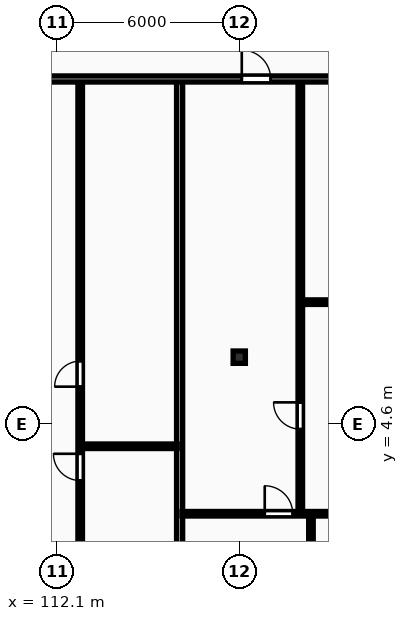
"""IFC4 building model, lengths in metres.
Left out: names, types, materials, properties, quantities, classifications, styles, units other than length and angle.
Written with IfcOpenShell. Run it as: python <this file> out.ifc"""

import sys

from ifc_helpers import new_model, si_unit, direction, frame, frame_2d, origin, origin_2d, place, context, subcontext, project, spatial, rectangle, i_section, extrude, element, fill, save


model = new_model("IFC4")
c1 = context("Model", 3, precision=1e-05, world=origin(), true_north=direction((0.0, 1.0)))
c2 = subcontext(c1, "Body", "Model", "MODEL_VIEW")
j1 = project(units=[si_unit("LENGTHUNIT", "METRE"), si_unit("PLANEANGLEUNIT", "RADIAN")], contexts=[c1])
p1 = place(None, origin())
s1 = spatial("IfcSite", under=j1, at=p1, CompositionType="ELEMENT")
p2 = place(p1, origin())
s2 = spatial("IfcBuilding", under=s1, at=p2, CompositionType="ELEMENT")
p3 = place(p2, frame((0.0, 0.0, 153.7)))
s3 = spatial("IfcBuildingStorey", under=s2, at=p3, CompositionType="ELEMENT", Elevation=153.7)
p4 = place(p3, frame((118.1, 6.8, 0.0), z_axis=(0.0, 0.0, 1.0), x_axis=(1.0, 0.0, 0.0)))
e1 = element("IfcColumn", 1, at=p4, inside=s3, PredefinedType="COLUMN", context=c2, shape_type="SweptSolid", body=[
    extrude(i_section(OverallWidth=0.403, OverallDepth=0.406, WebThickness=0.027, FlangeThickness=0.043, FilletRadius=0.015, at=origin_2d()), origin(), (0.0, 0.0, 1.0), 3.6),
])
p5 = place(p3, frame((116.138, -8.7, 0.0), z_axis=(0.0, 0.0, 1.0), x_axis=(0.0, 1.0, 0.0)))
e2 = element("IfcWall", 2, at=p5, inside=s3, PredefinedType="PARTITIONING", context=c2, shape_type="SweptSolid", body=[
    extrude(rectangle(XDim=24.57, YDim=0.2, at=frame_2d((12.285, 0.0))), origin(), (0.0, 0.0, 1.0), 3.32),
])
p6 = place(p3, frame((112.928, 3.87, 0.0), z_axis=(0.0, 0.0, 1.0), x_axis=(1.0, 0.0, 0.0)))
e3 = element("IfcWall", 3, at=p6, inside=s3, PredefinedType="PARTITIONING", context=c2, shape_type="SweptSolid", body=[
    extrude(rectangle(XDim=3.13, YDim=0.15, at=frame_2d((1.565, 0.0))), origin(), (0.0, 0.0, 1.0), 3.32),
])
p7 = place(p3, frame((112.868, -3.39, 0.0), z_axis=(0.0, 0.0, 1.0), x_axis=(0.0, 1.0, 0.0)))
e4 = element("IfcWall", 4, at=p7, inside=s3, PredefinedType="PARTITIONING", context=c2, shape_type="SweptSolid", body=[
    extrude(rectangle(XDim=19.28, YDim=0.15, at=frame_2d((9.64, 0.0))), origin(), (0.0, 0.0, 1.0), 3.32),
])
p8 = place(p7, frame((2.406, 0.0, 0.0)))
e5 = element("IfcOpeningElement", 5, at=p8, cuts=e4, PredefinedType="OPENING", context=c2, shape_type="SweptSolid", body=[
    extrude(rectangle(XDim=0.96, YDim=2.1, at=frame_2d((0.48, 1.05))), frame((0.0, 0.085, 0.0), z_axis=(0.0, -1.0, 0.0), x_axis=(1.0, 0.0, 0.0)), (0.0, 0.0, 1.0), 0.17),
])
p9 = place(p7, frame((6.133, 0.0, 0.0)))
e6 = element("IfcOpeningElement", 6, at=p9, cuts=e4, PredefinedType="OPENING", context=c2, shape_type="SweptSolid", body=[
    extrude(rectangle(XDim=0.88, YDim=2.06, at=frame_2d((0.44, 1.03))), frame((0.0, 0.085, 0.0), z_axis=(0.0, -1.0, 0.0), x_axis=(1.0, 0.0, 0.0)), (0.0, 0.0, 1.0), 0.17),
])
p10 = place(p7, frame((9.22, 0.0, 0.0)))
e7 = element("IfcOpeningElement", 7, at=p10, cuts=e4, PredefinedType="OPENING", context=c2, shape_type="SweptSolid", body=[
    extrude(rectangle(XDim=0.84, YDim=2.04, at=frame_2d((0.42, 1.02))), frame((0.0, 0.085, 0.0), z_axis=(0.0, -1.0, 0.0), x_axis=(1.0, 0.0, 0.0)), (0.0, 0.0, 1.0), 0.17),
])
p11 = place(p3, frame((120.168, 8.61, 0.0), z_axis=(0.0, 0.0, 1.0), x_axis=(1.0, 0.0, 0.0)))
e8 = element("IfcWall", 8, at=p11, inside=s3, PredefinedType="PARTITIONING", context=c2, shape_type="SweptSolid", body=[
    extrude(rectangle(XDim=10.452, YDim=0.15, at=frame_2d((5.226, 0.0))), origin(), (0.0, 0.0, 1.0), 3.32),
])
p12 = place(p11, frame((1.125, 0.0, 0.0)))
e9 = element("IfcOpeningElement", 9, at=p12, cuts=e8, PredefinedType="OPENING", context=c2, shape_type="SweptSolid", body=[
    extrude(rectangle(XDim=0.88, YDim=2.06, at=frame_2d((0.44, 1.03))), frame((0.0, 0.085, 0.0), z_axis=(0.0, -1.0, 0.0), x_axis=(1.0, 0.0, 0.0)), (0.0, 0.0, 1.0), 0.17),
])
p13 = place(p3, frame((120.108, 1.69, 0.0), z_axis=(0.0, 0.0, 1.0), x_axis=(0.0, 1.0, 0.0)))
e10 = element("IfcWall", 10, at=p13, inside=s3, PredefinedType="PARTITIONING", context=c2, shape_type="SweptSolid", body=[
    extrude(rectangle(XDim=14.2, YDim=0.15, at=frame_2d((7.1, 0.0))), origin(), (0.0, 0.0, 1.0), 3.32),
])
p14 = place(p13, frame((2.744, 0.0, 0.0)))
e11 = element("IfcOpeningElement", 11, at=p14, cuts=e10, PredefinedType="OPENING", context=c2, shape_type="SweptSolid", body=[
    extrude(rectangle(XDim=0.88, YDim=2.06, at=frame_2d((0.44, 1.03))), frame((0.0, 0.085, 0.0), z_axis=(0.0, -1.0, 0.0), x_axis=(1.0, 0.0, 0.0)), (0.0, 0.0, 1.0), 0.17),
])
p15 = place(p3, frame((120.458, -3.39, 0.0), z_axis=(0.0, 0.0, 1.0), x_axis=(0.0, 1.0, 0.0)))
e12 = element("IfcWall", 12, at=p15, inside=s3, PredefinedType="PARTITIONING", context=c2, shape_type="SweptSolid", body=[
    extrude(rectangle(XDim=5.0, YDim=0.15, at=frame_2d((2.5, 0.0))), origin(), (0.0, 0.0, 1.0), 3.32),
])
p16 = place(p15, frame((2.06, 0.0, 0.0)))
e13 = element("IfcOpeningElement", 13, at=p16, cuts=e12, PredefinedType="OPENING", context=c2, shape_type="SweptSolid", body=[
    extrude(rectangle(XDim=0.88, YDim=2.06, at=frame_2d((0.44, 1.03))), frame((0.0, 0.085, 0.0), z_axis=(0.0, -1.0, 0.0), x_axis=(1.0, 0.0, 0.0)), (0.0, 0.0, 1.0), 0.17),
])
p17 = place(p3, frame((116.218, 1.65, 0.0), z_axis=(0.0, 0.0, 1.0), x_axis=(1.0, 0.0, 0.0)))
e14 = element("IfcWall", 14, at=p17, inside=s3, PredefinedType="PARTITIONING", context=c2, shape_type="SweptSolid", body=[
    extrude(rectangle(XDim=14.402, YDim=0.15, at=frame_2d((7.201, 0.0))), origin(), (0.0, 0.0, 1.0), 3.32),
])
p18 = place(p17, frame((2.72, 0.0, 0.0)))
e15 = element("IfcOpeningElement", 15, at=p18, cuts=e14, PredefinedType="OPENING", context=c2, shape_type="SweptSolid", body=[
    extrude(rectangle(XDim=0.92, YDim=2.08, at=frame_2d((0.46, 1.04))), frame((0.0, 0.085, 0.0), z_axis=(0.0, -1.0, 0.0), x_axis=(1.0, 0.0, 0.0)), (0.0, 0.0, 1.0), 0.17),
])
p19 = place(p3, frame((72.7, 15.95, 0.0), z_axis=(0.0, 0.0, 1.0), x_axis=(1.0, 0.0, 0.0)))
e16 = element("IfcWall", 16, at=p19, inside=s3, PredefinedType="PARTITIONING", context=c2, shape_type="SweptSolid", body=[
    extrude(rectangle(XDim=58.0, YDim=0.2, at=frame_2d((29.0, 0.0))), origin(), (0.0, 0.0, 1.0), 3.32),
])
p20 = place(p19, frame((10.967, 0.0, 0.0)))
e17 = element("IfcOpeningElement", 17, at=p20, cuts=e16, PredefinedType="OPENING", context=c2, shape_type="SweptSolid", body=[
    extrude(rectangle(XDim=1.22, YDim=2.18, at=frame_2d((0.61, 1.09))), frame((0.0, 0.11, 0.0), z_axis=(0.0, -1.0, 0.0), x_axis=(1.0, 0.0, 0.0)), (0.0, 0.0, 1.0), 0.22),
])
p21 = place(p19, frame((31.36, 0.0, 0.0)))
e18 = element("IfcOpeningElement", 18, at=p21, cuts=e16, PredefinedType="OPENING", context=c2, shape_type="SweptSolid", body=[
    extrude(rectangle(XDim=1.22, YDim=2.18, at=frame_2d((0.61, 1.09))), frame((0.0, 0.11, 0.0), z_axis=(0.0, -1.0, 0.0), x_axis=(1.0, 0.0, 0.0)), (0.0, 0.0, 1.0), 0.22),
])
p22 = place(p19, frame((45.483, 0.0, 0.0)))
e19 = element("IfcOpeningElement", 19, at=p22, cuts=e16, PredefinedType="OPENING", context=c2, shape_type="SweptSolid", body=[
    extrude(rectangle(XDim=0.95, YDim=2.15, at=frame_2d((0.475, 1.075))), frame((0.0, 0.11, 0.0), z_axis=(0.0, -1.0, 0.0), x_axis=(1.0, 0.0, 0.0)), (0.0, 0.0, 1.0), 0.22),
])
p23 = place(p9, origin())
e20 = element("IfcDoor", 20, at=p23, inside=s3, OperationType="SINGLE_SWING_RIGHT", PredefinedType="DOOR", context=c2, shape_type="SweptSolid", body=[
    extrude(rectangle(XDim=0.88, YDim=2.06, at=frame_2d((0.44, 1.03))), frame((0.0, 0.025, 0.0), z_axis=(0.0, -1.0, 0.0), x_axis=(1.0, 0.0, 0.0)), (0.0, 0.0, 1.0), 0.05),
])
fill(e6, e20)
p24 = place(p10, origin())
e21 = element("IfcDoor", 21, at=p24, inside=s3, OperationType="SINGLE_SWING_LEFT", PredefinedType="DOOR", context=c2, shape_type="SweptSolid", body=[
    extrude(rectangle(XDim=0.84, YDim=2.04, at=frame_2d((0.42, 1.02))), frame((0.0, 0.025, 0.0), z_axis=(0.0, -1.0, 0.0), x_axis=(1.0, 0.0, 0.0)), (0.0, 0.0, 1.0), 0.05),
])
fill(e7, e21)
p25 = place(p14, origin())
e22 = element("IfcDoor", 22, at=p25, inside=s3, OperationType="SINGLE_SWING_RIGHT", PredefinedType="DOOR", context=c2, shape_type="SweptSolid", body=[
    extrude(rectangle(XDim=0.88, YDim=2.06, at=frame_2d((0.44, 1.03))), frame((0.0, 0.025, 0.0), z_axis=(0.0, -1.0, 0.0), x_axis=(1.0, 0.0, 0.0)), (0.0, 0.0, 1.0), 0.05),
])
fill(e11, e22)
p26 = place(p18, origin())
e23 = element("IfcDoor", 23, at=p26, inside=s3, OperationType="SINGLE_SWING_LEFT", PredefinedType="DOOR", context=c2, shape_type="SweptSolid", body=[
    extrude(rectangle(XDim=0.92, YDim=2.08, at=frame_2d((0.46, 1.04))), frame((0.0, 0.025, 0.0), z_axis=(0.0, -1.0, 0.0), x_axis=(1.0, 0.0, 0.0)), (0.0, 0.0, 1.0), 0.05),
])
fill(e15, e23)
p27 = place(p22, origin())
e24 = element("IfcDoor", 24, at=p27, inside=s3, OperationType="SINGLE_SWING_LEFT", PredefinedType="DOOR", context=c2, shape_type="SweptSolid", body=[
    extrude(rectangle(XDim=0.95, YDim=2.15, at=frame_2d((0.475, 1.075))), frame((0.0, 0.025, 0.0), z_axis=(0.0, -1.0, 0.0), x_axis=(1.0, 0.0, 0.0)), (0.0, 0.0, 1.0), 0.05),
])
fill(e19, e24)
save(model, sys.argv[1])
